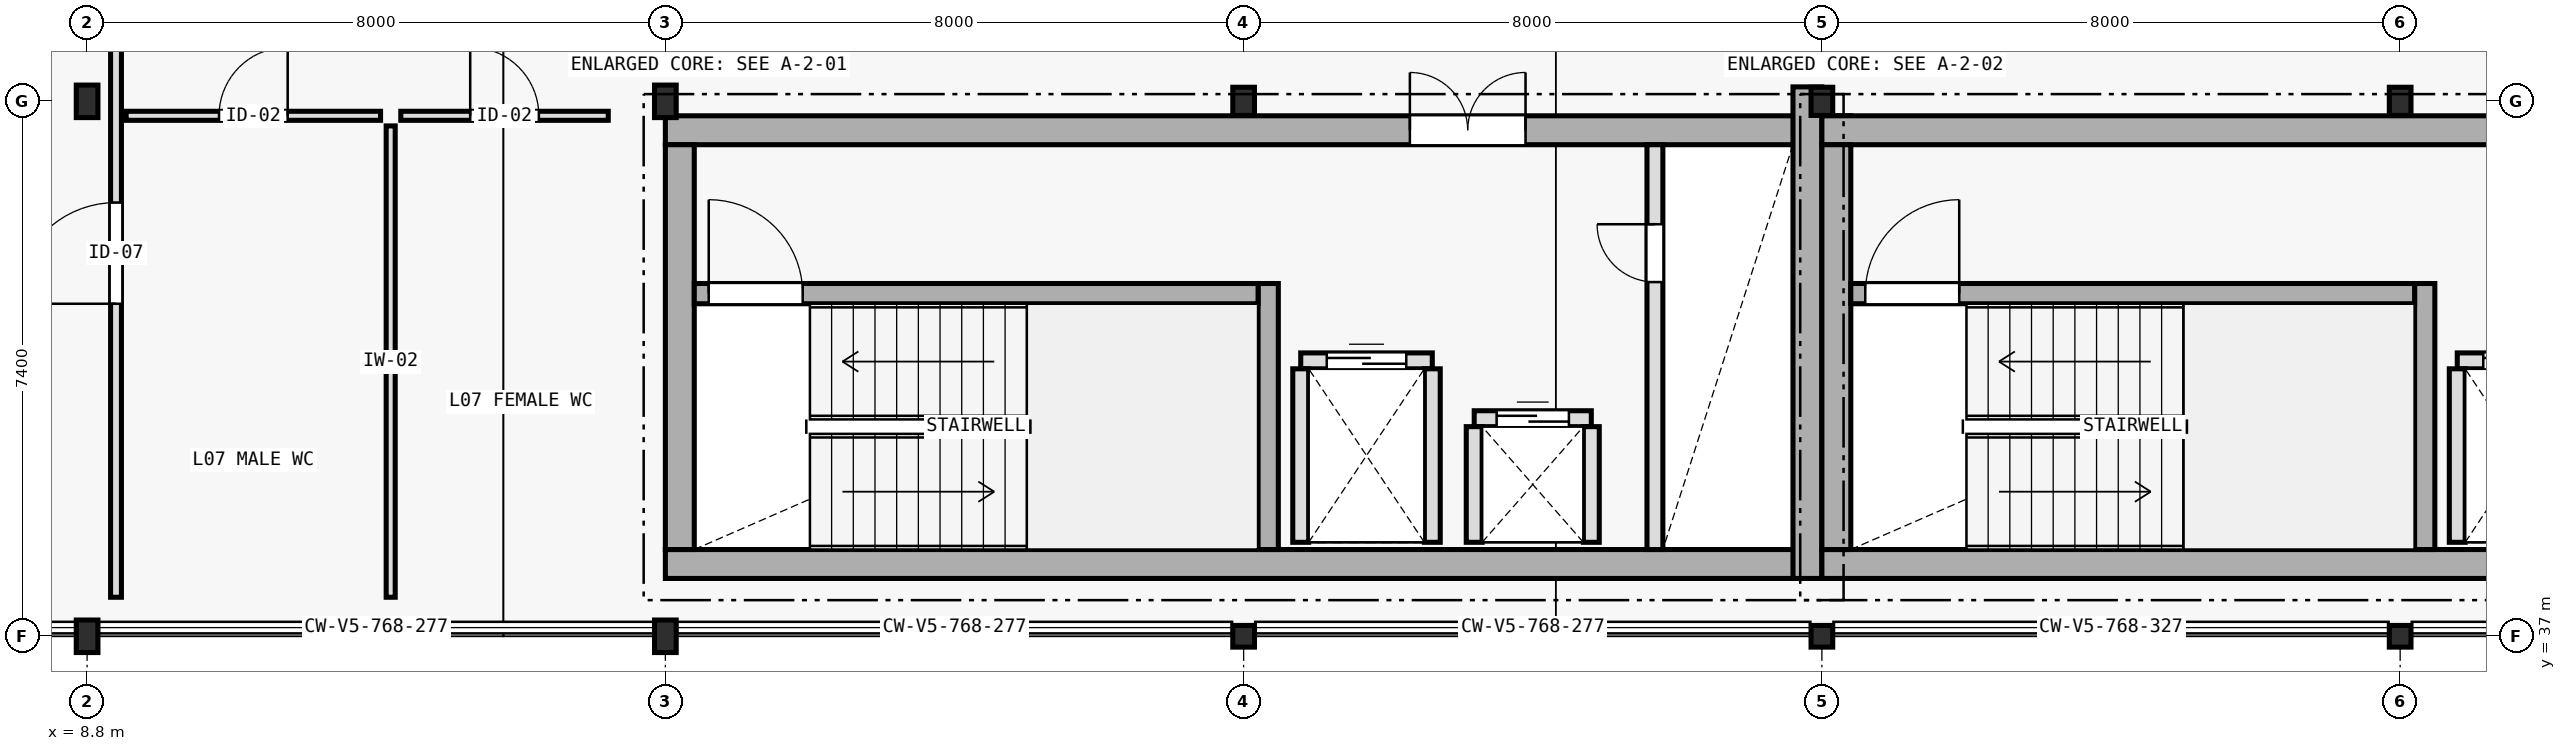
"""IFC4 building model, lengths in metres.
Left out: names, types, materials, properties, quantities, classifications, styles, units other than length and angle.
Written with IfcOpenShell. Run it as: python <this file> out.ifc"""

import sys

from ifc_helpers import new_model, si_unit, direction, frame, frame_2d, origin, origin_2d, place, context, subcontext, project, spatial, rectangle, i_section, extrude, element, fill, save


model = new_model("IFC4")
c1 = context("Model", 3, precision=1e-05, world=origin(), true_north=direction((0.0, 1.0)))
c2 = subcontext(c1, "Body", "Model", "MODEL_VIEW")
j1 = project(units=[si_unit("LENGTHUNIT", "METRE"), si_unit("PLANEANGLEUNIT", "RADIAN")], contexts=[c1])
p1 = place(None, origin())
s1 = spatial("IfcSite", under=j1, at=p1, CompositionType="ELEMENT")
p2 = place(p1, origin())
s2 = spatial("IfcBuilding", under=s1, at=p2, CompositionType="ELEMENT")
p3 = place(p2, frame((0.0, 0.0, 27.2)))
s3 = spatial("IfcBuildingStorey", under=s2, at=p3, CompositionType="ELEMENT", Elevation=27.2)
p4 = place(p3, frame((16.8, 38.0, 0.0), z_axis=(0.0, 0.0, 1.0), x_axis=(1.0, 0.0, 0.0)))
e1 = element("IfcWall", 1, at=p4, inside=s3, PredefinedType="SHEAR", context=c2, shape_type="SweptSolid", body=[
    extrude(rectangle(XDim=16.4, YDim=0.4, at=frame_2d((8.2, 0.0))), origin(), (0.0, 0.0, 1.0), 3.895),
])
p5 = place(p3, frame((16.8, 44.0, 0.0), z_axis=(0.0, 0.0, 1.0), x_axis=(1.0, 0.0, 0.0)))
e2 = element("IfcWall", 2, at=p5, inside=s3, PredefinedType="SHEAR", context=c2, shape_type="SweptSolid", body=[
    extrude(rectangle(XDim=16.4, YDim=0.4, at=frame_2d((8.2, 0.0))), origin(), (0.0, 0.0, 1.0), 3.895),
])
p6 = place(p5, frame((10.3, 0.0, 0.0)))
e3 = element("IfcOpeningElement", 3, at=p6, cuts=e2, PredefinedType="OPENING", context=c2, shape_type="SweptSolid", body=[
    extrude(rectangle(XDim=1.6, YDim=2.2, at=frame_2d((0.8, 1.1))), frame((0.0, 0.21, 0.0), z_axis=(0.0, -1.0, 0.0), x_axis=(1.0, 0.0, 0.0)), (0.0, 0.0, 1.0), 0.42),
])
p7 = place(p3, frame((17.0, 38.2, 0.0), z_axis=(0.0, 0.0, 1.0), x_axis=(0.0, 1.0, 0.0)))
e4 = element("IfcWall", 4, at=p7, inside=s3, PredefinedType="SHEAR", context=c2, shape_type="SweptSolid", body=[
    extrude(rectangle(XDim=5.6, YDim=0.4, at=frame_2d((2.8, 0.0))), origin(), (0.0, 0.0, 1.0), 3.895),
])
p8 = place(p3, frame((32.6, 37.8, 0.0), z_axis=(0.0, 0.0, 1.0), x_axis=(0.0, 1.0, 0.0)))
e5 = element("IfcWall", 5, at=p8, inside=s3, PredefinedType="SHEAR", context=c2, shape_type="SweptSolid", body=[
    extrude(rectangle(XDim=6.8, YDim=0.4, at=frame_2d((3.4, 0.0))), origin(), (0.0, 0.0, 1.0), 3.895),
])
p9 = place(p3, frame((25.14, 38.2, 0.0), z_axis=(0.0, 0.0, 1.0), x_axis=(0.0, 1.0, 0.0)))
e6 = element("IfcWall", 6, at=p9, inside=s3, PredefinedType="SHEAR", context=c2, shape_type="SweptSolid", body=[
    extrude(rectangle(XDim=3.68, YDim=0.28, at=frame_2d((1.84, 0.0))), origin(), (0.0, 0.0, 1.0), 3.895),
])
p10 = place(p3, frame((17.2, 41.74, 0.0), z_axis=(0.0, 0.0, 1.0), x_axis=(1.0, 0.0, 0.0)))
e7 = element("IfcWall", 7, at=p10, inside=s3, PredefinedType="SHEAR", context=c2, shape_type="SweptSolid", body=[
    extrude(rectangle(XDim=7.8, YDim=0.28, at=frame_2d((3.9, 0.0))), origin(), (0.0, 0.0, 1.0), 3.895),
])
p11 = place(p10, frame((0.2, 0.0, 0.0)))
e8 = element("IfcOpeningElement", 8, at=p11, cuts=e7, PredefinedType="OPENING", context=c2, shape_type="SweptSolid", body=[
    extrude(rectangle(XDim=1.3, YDim=2.2, at=frame_2d((0.65, 1.1))), frame((0.0, 0.15, 0.0), z_axis=(0.0, -1.0, 0.0), x_axis=(1.0, 0.0, 0.0)), (0.0, 0.0, 1.0), 0.3),
])
p12 = place(p3, frame((32.8, 38.0, 0.0), z_axis=(0.0, 0.0, 1.0), x_axis=(1.0, 0.0, 0.0)))
e9 = element("IfcWall", 9, at=p12, inside=s3, PredefinedType="SHEAR", context=c2, shape_type="SweptSolid", body=[
    extrude(rectangle(XDim=16.0, YDim=0.4, at=frame_2d((8.0, 0.0))), origin(), (0.0, 0.0, 1.0), 3.895),
])
p13 = place(p3, frame((32.8, 44.0, 0.0), z_axis=(0.0, 0.0, 1.0), x_axis=(1.0, 0.0, 0.0)))
e10 = element("IfcWall", 10, at=p13, inside=s3, PredefinedType="SHEAR", context=c2, shape_type="SweptSolid", body=[
    extrude(rectangle(XDim=16.0, YDim=0.4, at=frame_2d((8.0, 0.0))), origin(), (0.0, 0.0, 1.0), 3.895),
])
p14 = place(p13, frame((10.3, 0.0, 0.0)))
e11 = element("IfcOpeningElement", 11, at=p14, cuts=e10, PredefinedType="OPENING", context=c2, shape_type="SweptSolid", body=[
    extrude(rectangle(XDim=1.6, YDim=2.2, at=frame_2d((0.8, 1.1))), frame((0.0, 0.21, 0.0), z_axis=(0.0, -1.0, 0.0), x_axis=(1.0, 0.0, 0.0)), (0.0, 0.0, 1.0), 0.42),
])
p15 = place(p3, frame((33.0, 38.2, 0.0), z_axis=(0.0, 0.0, 1.0), x_axis=(0.0, 1.0, 0.0)))
e12 = element("IfcWall", 12, at=p15, inside=s3, PredefinedType="SHEAR", context=c2, shape_type="SweptSolid", body=[
    extrude(rectangle(XDim=5.6, YDim=0.4, at=frame_2d((2.8, 0.0))), origin(), (0.0, 0.0, 1.0), 3.895),
])
p16 = place(p3, frame((41.14, 38.2, 0.0), z_axis=(0.0, 0.0, 1.0), x_axis=(0.0, 1.0, 0.0)))
e13 = element("IfcWall", 13, at=p16, inside=s3, PredefinedType="SHEAR", context=c2, shape_type="SweptSolid", body=[
    extrude(rectangle(XDim=3.68, YDim=0.28, at=frame_2d((1.84, 0.0))), origin(), (0.0, 0.0, 1.0), 3.895),
])
p17 = place(p3, frame((33.2, 41.74, 0.0), z_axis=(0.0, 0.0, 1.0), x_axis=(1.0, 0.0, 0.0)))
e14 = element("IfcWall", 14, at=p17, inside=s3, PredefinedType="SHEAR", context=c2, shape_type="SweptSolid", body=[
    extrude(rectangle(XDim=7.8, YDim=0.28, at=frame_2d((3.9, 0.0))), origin(), (0.0, 0.0, 1.0), 3.895),
])
p18 = place(p17, frame((0.2, 0.0, 0.0)))
e15 = element("IfcOpeningElement", 15, at=p18, cuts=e14, PredefinedType="OPENING", context=c2, shape_type="SweptSolid", body=[
    extrude(rectangle(XDim=1.3, YDim=2.2, at=frame_2d((0.65, 1.1))), frame((0.0, 0.15, 0.0), z_axis=(0.0, -1.0, 0.0), x_axis=(1.0, 0.0, 0.0)), (0.0, 0.0, 1.0), 0.3),
])
for number, where, z_axis, x_axis in (
    (16, (8.8, 37.0, 0.0), (0.0, 0.0, 1.0), (1.0, 0.0, 0.0)),
    (17, (8.8, 44.4, 0.0), (0.0, 0.0, 1.0), (1.0, 0.0, 0.0)),
    (18, (16.8, 37.0, 0.0), (0.0, 0.0, 1.0), (1.0, 0.0, 0.0)),
    (19, (16.8, 44.4, 0.0), (0.0, 0.0, 1.0), (1.0, 0.0, 0.0)),
):
    element("IfcColumn", number, at=place(p3, frame(where, z_axis=z_axis, x_axis=x_axis)), inside=s3, PredefinedType="COLUMN", context=c2, shape_type="SweptSolid", body=[
        extrude(i_section(OverallWidth=0.3, OverallDepth=0.45, WebThickness=0.014, FlangeThickness=0.026, FilletRadius=0.027, at=origin_2d()), origin(), (0.0, 0.0, 1.0), 3.9),
    ])
p19 = place(p3, frame((24.8, 37.0, 0.0), z_axis=(0.0, 0.0, 1.0), x_axis=(1.0, 0.0, 0.0)))
e20 = element("IfcColumn", 20, at=p19, inside=s3, PredefinedType="COLUMN", context=c2, shape_type="SweptSolid", body=[
    extrude(i_section(OverallWidth=0.3, OverallDepth=0.3, WebThickness=0.011, FlangeThickness=0.019, FilletRadius=0.027, at=origin_2d()), origin(), (0.0, 0.0, 1.0), 3.9),
])
p20 = place(p3, frame((24.8, 44.4, 0.0), z_axis=(0.0, 0.0, 1.0), x_axis=(1.0, 0.0, 0.0)))
e21 = element("IfcColumn", 21, at=p20, inside=s3, PredefinedType="COLUMN", context=c2, shape_type="SweptSolid", body=[
    extrude(i_section(OverallWidth=0.3, OverallDepth=0.39, WebThickness=0.011, FlangeThickness=0.019, FilletRadius=0.027, at=origin_2d()), origin(), (0.0, 0.0, 1.0), 3.9),
])
p21 = place(p3, frame((32.8, 37.0, 0.0), z_axis=(0.0, 0.0, 1.0), x_axis=(1.0, 0.0, 0.0)))
e22 = element("IfcColumn", 22, at=p21, inside=s3, PredefinedType="COLUMN", context=c2, shape_type="SweptSolid", body=[
    extrude(i_section(OverallWidth=0.3, OverallDepth=0.3, WebThickness=0.011, FlangeThickness=0.019, FilletRadius=0.027, at=origin_2d()), origin(), (0.0, 0.0, 1.0), 3.9),
])
p22 = place(p3, frame((32.8, 44.4, 0.0), z_axis=(0.0, 0.0, 1.0), x_axis=(1.0, 0.0, 0.0)))
e23 = element("IfcColumn", 23, at=p22, inside=s3, PredefinedType="COLUMN", context=c2, shape_type="SweptSolid", body=[
    extrude(i_section(OverallWidth=0.3, OverallDepth=0.39, WebThickness=0.011, FlangeThickness=0.019, FilletRadius=0.027, at=origin_2d()), origin(), (0.0, 0.0, 1.0), 3.9),
])
p23 = place(p3, frame((40.8, 37.0, 0.0), z_axis=(0.0, 0.0, 1.0), x_axis=(1.0, 0.0, 0.0)))
e24 = element("IfcColumn", 24, at=p23, inside=s3, PredefinedType="COLUMN", context=c2, shape_type="SweptSolid", body=[
    extrude(i_section(OverallWidth=0.3, OverallDepth=0.3, WebThickness=0.011, FlangeThickness=0.019, FilletRadius=0.027, at=origin_2d()), origin(), (0.0, 0.0, 1.0), 3.9),
])
p24 = place(p3, frame((40.8, 44.4, 0.0), z_axis=(0.0, 0.0, 1.0), x_axis=(1.0, 0.0, 0.0)))
e25 = element("IfcColumn", 25, at=p24, inside=s3, PredefinedType="COLUMN", context=c2, shape_type="SweptSolid", body=[
    extrude(i_section(OverallWidth=0.3, OverallDepth=0.39, WebThickness=0.011, FlangeThickness=0.019, FilletRadius=0.027, at=origin_2d()), origin(), (0.0, 0.0, 1.0), 3.9),
])
p25 = place(p3, frame((25.59, 40.81, 0.0), z_axis=(0.0, 0.0, 1.0), x_axis=(1.0, 0.0, 0.0)))
e26 = element("IfcWall", 26, at=p25, inside=s3, PredefinedType="PLUMBINGWALL", context=c2, shape_type="SweptSolid", body=[
    extrude(rectangle(XDim=1.82, YDim=0.22, at=frame_2d((0.91, 0.0))), origin(), (0.0, 0.0, 1.0), 3.68),
])
p26 = place(p25, frame((0.36, 0.0, 0.0)))
e27 = element("IfcOpeningElement", 27, at=p26, cuts=e26, PredefinedType="OPENING", context=c2, shape_type="SweptSolid", body=[
    extrude(rectangle(XDim=1.1, YDim=2.2, at=frame_2d((0.55, 1.1))), frame((0.0, 0.12, 0.0), z_axis=(0.0, -1.0, 0.0), x_axis=(1.0, 0.0, 0.0)), (0.0, 0.0, 1.0), 0.24),
])
for number, where, z_axis, x_axis in (
    (28, (25.59, 38.3, 0.0), (0.0, 0.0, 1.0), (0.0, 1.0, 0.0)),
    (29, (27.41, 38.3, 0.0), (0.0, 0.0, 1.0), (0.0, 1.0, 0.0)),
):
    element("IfcWall", number, at=place(p3, frame(where, z_axis=z_axis, x_axis=x_axis)), inside=s3, PredefinedType="PLUMBINGWALL", context=c2, shape_type="SweptSolid", body=[
        extrude(rectangle(XDim=2.4, YDim=0.22, at=frame_2d((1.2, 0.0))), origin(), (0.0, 0.0, 1.0), 3.68),
    ])
p27 = place(p3, frame((27.99, 40.01, 0.0), z_axis=(0.0, 0.0, 1.0), x_axis=(1.0, 0.0, 0.0)))
e30 = element("IfcWall", 30, at=p27, inside=s3, PredefinedType="PLUMBINGWALL", context=c2, shape_type="SweptSolid", body=[
    extrude(rectangle(XDim=1.62, YDim=0.22, at=frame_2d((0.81, 0.0))), origin(), (0.0, 0.0, 1.0), 3.68),
])
p28 = place(p27, frame((0.31, 0.0, 0.0)))
e31 = element("IfcOpeningElement", 31, at=p28, cuts=e30, PredefinedType="OPENING", context=c2, shape_type="SweptSolid", body=[
    extrude(rectangle(XDim=1.0, YDim=2.2, at=frame_2d((0.5, 1.1))), frame((0.0, 0.12, 0.0), z_axis=(0.0, -1.0, 0.0), x_axis=(1.0, 0.0, 0.0)), (0.0, 0.0, 1.0), 0.24),
])
for number, where, z_axis, x_axis in (
    (32, (27.99, 38.3, 0.0), (0.0, 0.0, 1.0), (0.0, 1.0, 0.0)),
    (33, (29.61, 38.3, 0.0), (0.0, 0.0, 1.0), (0.0, 1.0, 0.0)),
):
    element("IfcWall", number, at=place(p3, frame(where, z_axis=z_axis, x_axis=x_axis)), inside=s3, PredefinedType="PLUMBINGWALL", context=c2, shape_type="SweptSolid", body=[
        extrude(rectangle(XDim=1.6, YDim=0.22, at=frame_2d((0.8, 0.0))), origin(), (0.0, 0.0, 1.0), 3.68),
    ])
p29 = place(p3, frame((30.49, 38.2, 0.0), z_axis=(0.0, 0.0, 1.0), x_axis=(0.0, 1.0, 0.0)))
e34 = element("IfcWall", 34, at=p29, inside=s3, PredefinedType="PLUMBINGWALL", context=c2, shape_type="SweptSolid", body=[
    extrude(rectangle(XDim=5.6, YDim=0.22, at=frame_2d((2.8, 0.0))), origin(), (0.0, 0.0, 1.0), 3.68),
])
p30 = place(p29, frame((3.7, 0.0, 0.0)))
e35 = element("IfcOpeningElement", 35, at=p30, cuts=e34, PredefinedType="OPENING", context=c2, shape_type="SweptSolid", body=[
    extrude(rectangle(XDim=0.8, YDim=2.1, at=frame_2d((0.4, 1.05))), frame((0.0, 0.12, 0.0), z_axis=(0.0, -1.0, 0.0), x_axis=(1.0, 0.0, 0.0)), (0.0, 0.0, 1.0), 0.24),
])
p31 = place(p3, frame((41.59, 40.81, 0.0), z_axis=(0.0, 0.0, 1.0), x_axis=(1.0, 0.0, 0.0)))
e36 = element("IfcWall", 36, at=p31, inside=s3, PredefinedType="PLUMBINGWALL", context=c2, shape_type="SweptSolid", body=[
    extrude(rectangle(XDim=1.82, YDim=0.22, at=frame_2d((0.91, 0.0))), origin(), (0.0, 0.0, 1.0), 3.68),
])
p32 = place(p31, frame((0.36, 0.0, 0.0)))
e37 = element("IfcOpeningElement", 37, at=p32, cuts=e36, PredefinedType="OPENING", context=c2, shape_type="SweptSolid", body=[
    extrude(rectangle(XDim=1.1, YDim=2.2, at=frame_2d((0.55, 1.1))), frame((0.0, 0.12, 0.0), z_axis=(0.0, -1.0, 0.0), x_axis=(1.0, 0.0, 0.0)), (0.0, 0.0, 1.0), 0.24),
])
p33 = place(p3, frame((41.59, 38.3, 0.0), z_axis=(0.0, 0.0, 1.0), x_axis=(0.0, 1.0, 0.0)))
e38 = element("IfcWall", 38, at=p33, inside=s3, PredefinedType="PLUMBINGWALL", context=c2, shape_type="SweptSolid", body=[
    extrude(rectangle(XDim=2.4, YDim=0.22, at=frame_2d((1.2, 0.0))), origin(), (0.0, 0.0, 1.0), 3.68),
])
p34 = place(p3, frame((9.2, 37.54, 0.0), z_axis=(0.0, 0.0, 1.0), x_axis=(0.0, 1.0, 0.0)))
e39 = element("IfcWall", 39, at=p34, inside=s3, PredefinedType="PARTITIONING", context=c2, shape_type="SweptSolid", body=[
    extrude(rectangle(XDim=9.52, YDim=0.15, at=frame_2d((4.76, 0.0))), origin(), (0.0, 0.0, 1.0), 2.76),
])
p35 = place(p34, frame((4.06, 0.0, 0.0)))
e40 = element("IfcOpeningElement", 40, at=p35, cuts=e39, PredefinedType="OPENING", context=c2, shape_type="SweptSolid", body=[
    extrude(rectangle(XDim=1.4, YDim=2.2, at=frame_2d((0.7, 1.1))), frame((0.0, 0.085, 0.0), z_axis=(0.0, -1.0, 0.0), x_axis=(1.0, 0.0, 0.0)), (0.0, 0.0, 1.0), 0.17),
])
p36 = place(p3, frame((9.34, 44.2, 0.0), z_axis=(0.0, 0.0, 1.0), x_axis=(1.0, 0.0, 0.0)))
e41 = element("IfcWall", 41, at=p36, inside=s3, PredefinedType="PARTITIONING", context=c2, shape_type="SweptSolid", body=[
    extrude(rectangle(XDim=3.52, YDim=0.125, at=frame_2d((1.76, 0.0))), origin(), (0.0, 0.0, 1.0), 2.76),
])
p37 = place(p36, frame((1.285, 0.0, 0.0)))
e42 = element("IfcOpeningElement", 42, at=p37, cuts=e41, PredefinedType="OPENING", context=c2, shape_type="SweptSolid", body=[
    extrude(rectangle(XDim=0.95, YDim=2.1, at=frame_2d((0.475, 1.05))), frame((0.0, 0.073, 0.0), z_axis=(0.0, -1.0, 0.0), x_axis=(1.0, 0.0, 0.0)), (0.0, 0.0, 1.0), 0.145),
])
p38 = place(p3, frame((13.0, 37.54, 0.0), z_axis=(0.0, 0.0, 1.0), x_axis=(0.0, 1.0, 0.0)))
e43 = element("IfcWall", 43, at=p38, inside=s3, PredefinedType="PARTITIONING", context=c2, shape_type="SweptSolid", body=[
    extrude(rectangle(XDim=6.52, YDim=0.125, at=frame_2d((3.26, 0.0))), origin(), (0.0, 0.0, 1.0), 3.57),
])
p39 = place(p3, frame((13.14, 44.2, 0.0), z_axis=(0.0, 0.0, 1.0), x_axis=(1.0, 0.0, 0.0)))
e44 = element("IfcWall", 44, at=p39, inside=s3, PredefinedType="PARTITIONING", context=c2, shape_type="SweptSolid", body=[
    extrude(rectangle(XDim=2.87, YDim=0.125, at=frame_2d((1.435, 0.0))), origin(), (0.0, 0.0, 1.0), 2.76),
])
p40 = place(p39, frame((0.96, 0.0, 0.0)))
e45 = element("IfcOpeningElement", 45, at=p40, cuts=e44, PredefinedType="OPENING", context=c2, shape_type="SweptSolid", body=[
    extrude(rectangle(XDim=0.95, YDim=2.1, at=frame_2d((0.475, 1.05))), frame((0.0, 0.073, 0.0), z_axis=(0.0, -1.0, 0.0), x_axis=(1.0, 0.0, 0.0)), (0.0, 0.0, 1.0), 0.145),
])
p41 = place(p11, origin())
e46 = element("IfcDoor", 46, at=p41, inside=s3, OperationType="SINGLE_SWING_LEFT", PredefinedType="DOOR", context=c2, shape_type="SweptSolid", body=[
    extrude(rectangle(XDim=1.3, YDim=2.2, at=frame_2d((0.65, 1.1))), frame((0.0, 0.025, 0.0), z_axis=(0.0, -1.0, 0.0), x_axis=(1.0, 0.0, 0.0)), (0.0, 0.0, 1.0), 0.05),
])
fill(e8, e46)
p42 = place(p26, origin())
e47 = element("IfcDoor", 47, at=p42, inside=s3, OperationType="DOUBLE_DOOR_SLIDING", PredefinedType="DOOR", context=c2, shape_type="SweptSolid", body=[
    extrude(rectangle(XDim=1.1, YDim=2.2, at=frame_2d((0.55, 1.1))), frame((0.0, 0.025, 0.0), z_axis=(0.0, -1.0, 0.0), x_axis=(1.0, 0.0, 0.0)), (0.0, 0.0, 1.0), 0.05),
])
fill(e27, e47)
p43 = place(p28, origin())
e48 = element("IfcDoor", 48, at=p43, inside=s3, OperationType="DOUBLE_DOOR_SLIDING", PredefinedType="DOOR", context=c2, shape_type="SweptSolid", body=[
    extrude(rectangle(XDim=1.0, YDim=2.2, at=frame_2d((0.5, 1.1))), frame((0.0, 0.025, 0.0), z_axis=(0.0, -1.0, 0.0), x_axis=(1.0, 0.0, 0.0)), (0.0, 0.0, 1.0), 0.05),
])
fill(e31, e48)
p44 = place(p30, origin())
e49 = element("IfcDoor", 49, at=p44, inside=s3, OperationType="SINGLE_SWING_RIGHT", PredefinedType="DOOR", context=c2, shape_type="SweptSolid", body=[
    extrude(rectangle(XDim=0.8, YDim=2.1, at=frame_2d((0.4, 1.05))), frame((0.0, 0.025, 0.0), z_axis=(0.0, -1.0, 0.0), x_axis=(1.0, 0.0, 0.0)), (0.0, 0.0, 1.0), 0.05),
])
fill(e35, e49)
p45 = place(p6, origin())
e50 = element("IfcDoor", 50, at=p45, inside=s3, OperationType="DOUBLE_DOOR_SINGLE_SWING", PredefinedType="DOOR", context=c2, shape_type="SweptSolid", body=[
    extrude(rectangle(XDim=1.6, YDim=2.2, at=frame_2d((0.8, 1.1))), frame((0.0, 0.025, 0.0), z_axis=(0.0, -1.0, 0.0), x_axis=(1.0, 0.0, 0.0)), (0.0, 0.0, 1.0), 0.05),
])
fill(e3, e50)
p46 = place(p18, origin())
e51 = element("IfcDoor", 51, at=p46, inside=s3, OperationType="SINGLE_SWING_RIGHT", PredefinedType="DOOR", context=c2, shape_type="SweptSolid", body=[
    extrude(rectangle(XDim=1.3, YDim=2.2, at=frame_2d((0.65, 1.1))), frame((0.0, 0.025, 0.0), z_axis=(0.0, -1.0, 0.0), x_axis=(1.0, 0.0, 0.0)), (0.0, 0.0, 1.0), 0.05),
])
fill(e15, e51)
p47 = place(p32, origin())
e52 = element("IfcDoor", 52, at=p47, inside=s3, OperationType="DOUBLE_DOOR_SLIDING", PredefinedType="DOOR", context=c2, shape_type="SweptSolid", body=[
    extrude(rectangle(XDim=1.1, YDim=2.2, at=frame_2d((0.55, 1.1))), frame((0.0, 0.025, 0.0), z_axis=(0.0, -1.0, 0.0), x_axis=(1.0, 0.0, 0.0)), (0.0, 0.0, 1.0), 0.05),
])
fill(e37, e52)
p48 = place(p35, origin())
e53 = element("IfcDoor", 53, at=p48, inside=s3, OperationType="SINGLE_SWING_LEFT", PredefinedType="DOOR", context=c2, shape_type="SweptSolid", body=[
    extrude(rectangle(XDim=1.4, YDim=2.2, at=frame_2d((0.7, 1.1))), frame((0.0, 0.025, 0.0), z_axis=(0.0, -1.0, 0.0), x_axis=(1.0, 0.0, 0.0)), (0.0, 0.0, 1.0), 0.05),
])
fill(e40, e53)
p49 = place(p37, origin())
e54 = element("IfcDoor", 54, at=p49, inside=s3, OperationType="SINGLE_SWING_RIGHT", PredefinedType="DOOR", context=c2, shape_type="SweptSolid", body=[
    extrude(rectangle(XDim=0.95, YDim=2.1, at=frame_2d((0.475, 1.05))), frame((0.0, 0.025, 0.0), z_axis=(0.0, -1.0, 0.0), x_axis=(1.0, 0.0, 0.0)), (0.0, 0.0, 1.0), 0.05),
])
fill(e42, e54)
p50 = place(p40, origin())
e55 = element("IfcDoor", 55, at=p50, inside=s3, OperationType="SINGLE_SWING_LEFT", PredefinedType="DOOR", context=c2, shape_type="SweptSolid", body=[
    extrude(rectangle(XDim=0.95, YDim=2.1, at=frame_2d((0.475, 1.05))), frame((0.0, 0.025, 0.0), z_axis=(0.0, -1.0, 0.0), x_axis=(1.0, 0.0, 0.0)), (0.0, 0.0, 1.0), 0.05),
])
fill(e45, e55)
save(model, sys.argv[1])
